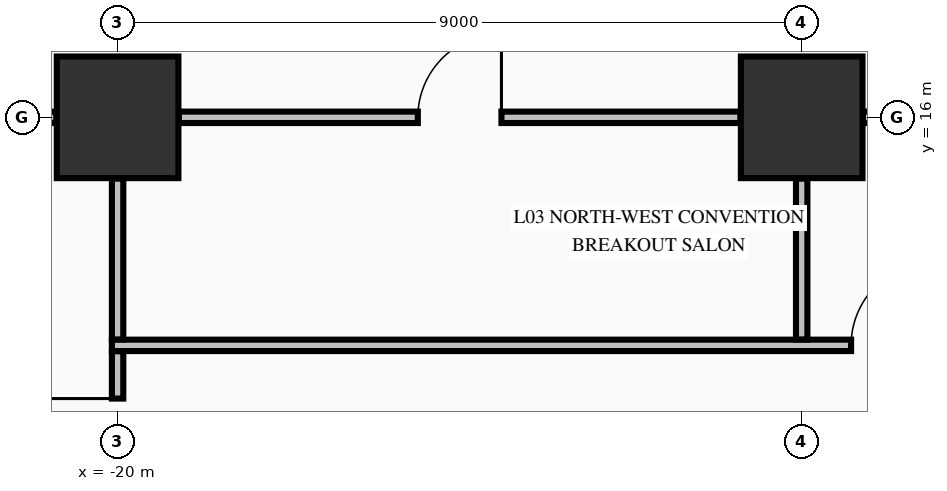
"""IFC4 building model, lengths in metres.
Left out: names, types, materials, properties, quantities, classifications, styles, units other than length and angle.
Written with IfcOpenShell. Run it as: python <this file> out.ifc"""

import sys

from ifc_helpers import new_model, si_unit, direction, frame, frame_2d, origin, origin_2d, place, context, subcontext, project, spatial, rectangle, extrude, element, fill, save


model = new_model("IFC4")
c1 = context("Model", 3, precision=1e-05, world=origin(), true_north=direction((0.0, 1.0)))
c2 = subcontext(c1, "Body", "Model", "MODEL_VIEW")
j1 = project(units=[si_unit("LENGTHUNIT", "METRE"), si_unit("PLANEANGLEUNIT", "RADIAN")], contexts=[c1])
p1 = place(None, origin())
s1 = spatial("IfcSite", under=j1, at=p1, CompositionType="ELEMENT")
p2 = place(p1, origin())
s2 = spatial("IfcBuilding", under=s1, at=p2, CompositionType="ELEMENT")
p3 = place(p2, frame((0.0, 0.0, 16.32)))
s3 = spatial("IfcBuildingStorey", under=s2, at=p3, CompositionType="ELEMENT", Elevation=16.32)
for number, where, z_axis, x_axis in (
    (1, (-20.0, 16.0, 0.0), (0.0, 0.0, 1.0), (1.0, 0.0, 0.0)),
    (2, (-11.0, 16.0, 0.0), (0.0, 0.0, 1.0), (1.0, 0.0, 0.0)),
):
    element("IfcColumn", number, at=place(p3, frame(where, z_axis=z_axis, x_axis=x_axis)), inside=s3, PredefinedType="COLUMN", context=c2, shape_type="SweptSolid", body=[
        extrude(rectangle(XDim=1.6, YDim=1.6, at=origin_2d()), origin(), (0.0, 0.0, 1.0), 4.99),
    ])
p4 = place(p3, frame((-20.075, 13.0, 0.0), z_axis=(0.0, 0.0, 1.0), x_axis=(1.0, 0.0, 0.0)))
e3 = element("IfcWall", 3, at=p4, inside=s3, PredefinedType="PARTITIONING", context=c2, shape_type="SweptSolid", body=[
    extrude(rectangle(XDim=11.415, YDim=0.15, at=frame_2d((5.708, 0.0))), origin(), (0.0, 0.0, 1.0), 4.99),
])
p5 = place(p4, frame((9.725, 0.0, 0.0)))
e4 = element("IfcOpeningElement", 4, at=p5, cuts=e3, PredefinedType="OPENING", context=c2, shape_type="SweptSolid", body=[
    extrude(rectangle(XDim=1.1, YDim=2.15, at=frame_2d((0.55, 1.075))), frame((0.0, 0.085, 0.0), z_axis=(0.0, -1.0, 0.0), x_axis=(1.0, 0.0, 0.0)), (0.0, 0.0, 1.0), 0.17),
])
p6 = place(p3, frame((-25.294, 16.0, 0.0), z_axis=(0.0, 0.0, 1.0), x_axis=(1.0, 0.0, 0.0)))
e5 = element("IfcWall", 5, at=p6, inside=s3, PredefinedType="PARTITIONING", context=c2, shape_type="SweptSolid", body=[
    extrude(rectangle(XDim=4.488, YDim=0.15, at=frame_2d((2.244, 0.0))), origin(), (0.0, 0.0, 1.0), 3.332),
])
p7 = place(p6, frame((3.238, 0.0, 0.0)))
e6 = element("IfcOpeningElement", 6, at=p7, cuts=e5, PredefinedType="OPENING", context=c2, shape_type="SweptSolid", body=[
    extrude(rectangle(XDim=1.1, YDim=2.15, at=frame_2d((0.55, 1.075))), frame((0.0, 0.085, 0.0), z_axis=(0.0, -1.0, 0.0), x_axis=(1.0, 0.0, 0.0)), (0.0, 0.0, 1.0), 0.17),
])
p8 = place(p3, frame((-19.194, 16.0, 0.0), z_axis=(0.0, 0.0, 1.0), x_axis=(1.0, 0.0, 0.0)))
e7 = element("IfcWall", 7, at=p8, inside=s3, PredefinedType="PARTITIONING", context=c2, shape_type="SweptSolid", body=[
    extrude(rectangle(XDim=7.388, YDim=0.15, at=frame_2d((3.694, 0.0))), origin(), (0.0, 0.0, 1.0), 3.332),
])
p9 = place(p8, frame((3.144, 0.0, 0.0)))
e8 = element("IfcOpeningElement", 8, at=p9, cuts=e7, PredefinedType="OPENING", context=c2, shape_type="SweptSolid", body=[
    extrude(rectangle(XDim=1.1, YDim=2.15, at=frame_2d((0.55, 1.075))), frame((0.0, 0.085, 0.0), z_axis=(0.0, -1.0, 0.0), x_axis=(1.0, 0.0, 0.0)), (0.0, 0.0, 1.0), 0.17),
])
p10 = place(p3, frame((-10.194, 16.0, 0.0), z_axis=(0.0, 0.0, 1.0), x_axis=(1.0, 0.0, 0.0)))
e9 = element("IfcWall", 9, at=p10, inside=s3, PredefinedType="PARTITIONING", context=c2, shape_type="SweptSolid", body=[
    extrude(rectangle(XDim=0.988, YDim=0.15, at=frame_2d((0.494, 0.0))), origin(), (0.0, 0.0, 1.0), 3.332),
])
p11 = place(p3, frame((-20.0, 10.678, 0.0), z_axis=(0.0, 0.0, 1.0), x_axis=(0.0, 1.0, 0.0)))
e10 = element("IfcWall", 10, at=p11, inside=s3, PredefinedType="PARTITIONING", context=c2, shape_type="SweptSolid", body=[
    extrude(rectangle(XDim=2.244, YDim=0.15, at=frame_2d((1.122, 0.0))), origin(), (0.0, 0.0, 1.0), 4.032),
])
p12 = place(p11, frame((0.522, 0.0, 0.0)))
e11 = element("IfcOpeningElement", 11, at=p12, cuts=e10, PredefinedType="OPENING", context=c2, shape_type="SweptSolid", body=[
    extrude(rectangle(XDim=1.1, YDim=2.15, at=frame_2d((0.55, 1.075))), frame((0.0, 0.085, 0.0), z_axis=(0.0, -1.0, 0.0), x_axis=(1.0, 0.0, 0.0)), (0.0, 0.0, 1.0), 0.17),
])
p13 = place(p3, frame((-20.0, 13.078, 0.0), z_axis=(0.0, 0.0, 1.0), x_axis=(0.0, 1.0, 0.0)))
e12 = element("IfcWall", 12, at=p13, inside=s3, PredefinedType="PARTITIONING", context=c2, shape_type="SweptSolid", body=[
    extrude(rectangle(XDim=2.116, YDim=0.15, at=frame_2d((1.058, 0.0))), origin(), (0.0, 0.0, 1.0), 4.032),
])
p14 = place(p3, frame((-11.0, 13.078, 0.0), z_axis=(0.0, 0.0, 1.0), x_axis=(0.0, 1.0, 0.0)))
e13 = element("IfcWall", 13, at=p14, inside=s3, PredefinedType="PARTITIONING", context=c2, shape_type="SweptSolid", body=[
    extrude(rectangle(XDim=2.116, YDim=0.15, at=frame_2d((1.058, 0.0))), origin(), (0.0, 0.0, 1.0), 3.332),
])
p15 = place(p9, origin())
e14 = element("IfcDoor", 14, at=p15, inside=s3, OperationType="SINGLE_SWING_RIGHT", PredefinedType="DOOR", context=c2, shape_type="SweptSolid", body=[
    extrude(rectangle(XDim=1.1, YDim=2.15, at=frame_2d((0.55, 1.075))), frame((0.0, 0.025, 0.0), z_axis=(0.0, -1.0, 0.0), x_axis=(1.0, 0.0, 0.0)), (0.0, 0.0, 1.0), 0.05),
])
fill(e8, e14)
p16 = place(p5, origin())
e15 = element("IfcDoor", 15, at=p16, inside=s3, OperationType="SINGLE_SWING_RIGHT", PredefinedType="DOOR", context=c2, shape_type="SweptSolid", body=[
    extrude(rectangle(XDim=1.1, YDim=2.15, at=frame_2d((0.55, 1.075))), frame((0.0, 0.025, 0.0), z_axis=(0.0, -1.0, 0.0), x_axis=(1.0, 0.0, 0.0)), (0.0, 0.0, 1.0), 0.05),
])
fill(e4, e15)
p17 = place(p12, origin())
e16 = element("IfcDoor", 16, at=p17, inside=s3, OperationType="SINGLE_SWING_RIGHT", PredefinedType="DOOR", context=c2, shape_type="SweptSolid", body=[
    extrude(rectangle(XDim=1.1, YDim=2.15, at=frame_2d((0.55, 1.075))), frame((0.0, 0.025, 0.0), z_axis=(0.0, -1.0, 0.0), x_axis=(1.0, 0.0, 0.0)), (0.0, 0.0, 1.0), 0.05),
])
fill(e11, e16)
save(model, sys.argv[1])
